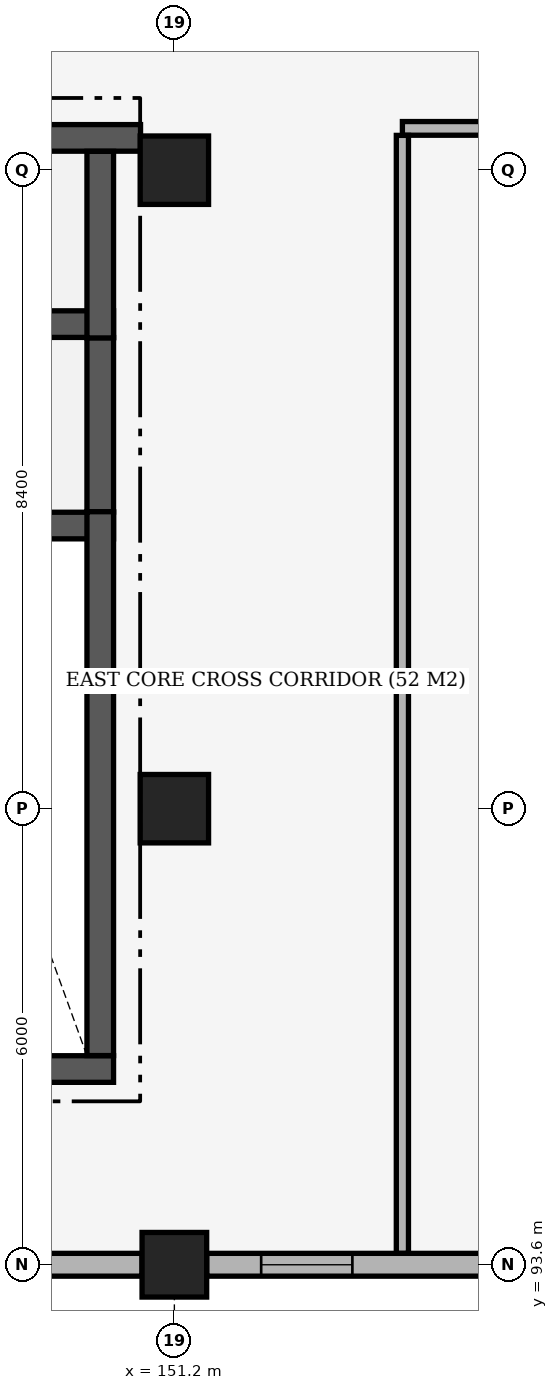
"""IFC4 building model, lengths in metres.
Left out: names, types, materials, properties, quantities, classifications, styles, units other than length and angle.
Written with IfcOpenShell. Run it as: python <this file> out.ifc"""

import sys

from ifc_helpers import new_model, si_unit, direction, frame, frame_2d, origin, origin_2d, place, context, subcontext, project, spatial, rectangle, extrude, element, fill, save


model = new_model("IFC4")
c1 = context("Model", 3, precision=1e-05, world=origin(), true_north=direction((0.0, 1.0)))
c2 = subcontext(c1, "Body", "Model", "MODEL_VIEW")
j1 = project(units=[si_unit("LENGTHUNIT", "METRE"), si_unit("PLANEANGLEUNIT", "RADIAN")], contexts=[c1])
p1 = place(None, origin())
s1 = spatial("IfcSite", under=j1, at=p1, CompositionType="ELEMENT")
p2 = place(p1, origin())
s2 = spatial("IfcBuilding", under=s1, at=p2, CompositionType="ELEMENT")
p3 = place(p2, origin())
s3 = spatial("IfcBuildingStorey", under=s2, at=p3, CompositionType="ELEMENT", Elevation=0.0)
p4 = place(p3, frame((151.2, 93.6, 0.0), z_axis=(0.0, 0.0, 1.0), x_axis=(1.0, 0.0, 0.0)))
e1 = element("IfcColumn", 1, at=p4, inside=s3, PredefinedType="COLUMN", context=c2, shape_type="SweptSolid", body=[
    extrude(rectangle(XDim=0.85, YDim=0.85, at=origin_2d()), origin(), (0.0, 0.0, 1.0), 5.1),
])
for number, where, z_axis, x_axis in (
    (2, (151.2, 99.6, 0.0), (0.0, 0.0, 1.0), (1.0, 0.0, 0.0)),
    (3, (151.2, 108.0, 0.0), (0.0, 0.0, 1.0), (1.0, 0.0, 0.0)),
):
    element("IfcColumn", number, at=place(p3, frame(where, z_axis=z_axis, x_axis=x_axis)), inside=s3, PredefinedType="COLUMN", context=c2, shape_type="SweptSolid", body=[
        extrude(rectangle(XDim=0.9, YDim=0.9, at=origin_2d()), origin(), (0.0, 0.0, 1.0), 5.1),
    ])
p5 = place(p3, frame((156.175, 93.6, 0.0), z_axis=(0.0, 0.0, 1.0), x_axis=(-1.0, 0.0, 0.0)))
e4 = element("IfcWall", 4, at=p5, inside=s3, PredefinedType="SOLIDWALL", context=c2, shape_type="SweptSolid", body=[
    extrude(rectangle(XDim=4.55, YDim=0.3, at=frame_2d((2.275, 0.0))), origin(), (0.0, 0.0, 1.0), 4.22),
])
p6 = place(p5, frame((2.633, 0.0, 0.85)))
e5 = element("IfcOpeningElement", 5, at=p6, cuts=e4, PredefinedType="OPENING", context=c2, shape_type="SweptSolid", body=[
    extrude(rectangle(XDim=1.2, YDim=2.4, at=frame_2d((0.6, 1.2))), frame((0.0, 0.165, 0.0), z_axis=(0.0, -1.0, 0.0), x_axis=(1.0, 0.0, 0.0)), (0.0, 0.0, 1.0), 0.33),
])
p7 = place(p3, frame((150.775, 93.6, 0.0), z_axis=(0.0, 0.0, 1.0), x_axis=(-1.0, 0.0, 0.0)))
e6 = element("IfcWall", 6, at=p7, inside=s3, PredefinedType="SOLIDWALL", context=c2, shape_type="SweptSolid", body=[
    extrude(rectangle(XDim=7.55, YDim=0.3, at=frame_2d((3.775, 0.0))), origin(), (0.0, 0.0, 1.0), 4.12),
])
p8 = place(p7, frame((1.717, 0.0, 0.85)))
e7 = element("IfcOpeningElement", 7, at=p8, cuts=e6, PredefinedType="OPENING", context=c2, shape_type="SweptSolid", body=[
    extrude(rectangle(XDim=1.2, YDim=2.4, at=frame_2d((0.6, 1.2))), frame((0.0, 0.165, 0.0), z_axis=(0.0, -1.0, 0.0), x_axis=(1.0, 0.0, 0.0)), (0.0, 0.0, 1.0), 0.33),
])
p9 = place(p7, frame((4.633, 0.0, 0.85)))
e8 = element("IfcOpeningElement", 8, at=p9, cuts=e6, PredefinedType="OPENING", context=c2, shape_type="SweptSolid", body=[
    extrude(rectangle(XDim=1.2, YDim=2.4, at=frame_2d((0.6, 1.2))), frame((0.0, 0.165, 0.0), z_axis=(0.0, -1.0, 0.0), x_axis=(1.0, 0.0, 0.0)), (0.0, 0.0, 1.0), 0.33),
])
p10 = place(p3, frame((147.468, 103.325, 0.0), z_axis=(0.0, 0.0, 1.0), x_axis=(1.0, 0.0, 0.0)))
e9 = element("IfcWall", 9, at=p10, inside=s3, PredefinedType="SHEAR", context=c2, shape_type="SweptSolid", body=[
    extrude(rectangle(XDim=2.932, YDim=0.35, at=frame_2d((1.466, 0.0))), origin(), (0.0, 0.0, 1.0), 4.82),
])
p11 = place(p3, frame((147.2, 105.975, 0.0), z_axis=(0.0, 0.0, 1.0), x_axis=(1.0, 0.0, 0.0)))
e10 = element("IfcWall", 10, at=p11, inside=s3, PredefinedType="SHEAR", context=c2, shape_type="SweptSolid", body=[
    extrude(rectangle(XDim=3.2, YDim=0.35, at=frame_2d((1.6, 0.0))), origin(), (0.0, 0.0, 1.0), 4.82),
])
p12 = place(p3, frame((150.225, 103.502, 0.0), z_axis=(0.0, 0.0, 1.0), x_axis=(0.0, 1.0, 0.0)))
e11 = element("IfcWall", 11, at=p12, inside=s3, PredefinedType="SHEAR", context=c2, shape_type="SweptSolid", body=[
    extrude(rectangle(XDim=2.296, YDim=0.35, at=frame_2d((1.148, 0.0))), origin(), (0.0, 0.0, 1.0), 4.82),
])
p13 = place(p3, frame((147.2, 108.425, 0.0), z_axis=(0.0, 0.0, 1.0), x_axis=(1.0, 0.0, 0.0)))
e12 = element("IfcWall", 12, at=p13, inside=s3, PredefinedType="SHEAR", context=c2, shape_type="SweptSolid", body=[
    extrude(rectangle(XDim=3.555, YDim=0.35, at=frame_2d((1.777, 0.0))), origin(), (0.0, 0.0, 1.0), 4.82),
])
p14 = place(p3, frame((150.225, 105.793, 0.0), z_axis=(0.0, 0.0, 1.0), x_axis=(0.0, 1.0, 0.0)))
e13 = element("IfcWall", 13, at=p14, inside=s3, PredefinedType="SHEAR", context=c2, shape_type="SweptSolid", body=[
    extrude(rectangle(XDim=2.455, YDim=0.35, at=frame_2d((1.228, 0.0))), origin(), (0.0, 0.0, 1.0), 4.82),
])
p15 = place(p3, frame((147.55, 96.175, 0.0), z_axis=(0.0, 0.0, 1.0), x_axis=(1.0, 0.0, 0.0)))
e14 = element("IfcWall", 14, at=p15, inside=s3, PredefinedType="SHEAR", context=c2, shape_type="SweptSolid", body=[
    extrude(rectangle(XDim=2.85, YDim=0.35, at=frame_2d((1.425, 0.0))), origin(), (0.0, 0.0, 1.0), 4.82),
])
p16 = place(p3, frame((150.225, 96.352, 0.0), z_axis=(0.0, 0.0, 1.0), x_axis=(0.0, 1.0, 0.0)))
e15 = element("IfcWall", 15, at=p16, inside=s3, PredefinedType="SHEAR", context=c2, shape_type="SweptSolid", body=[
    extrude(rectangle(XDim=7.155, YDim=0.35, at=frame_2d((3.578, 0.0))), origin(), (0.0, 0.0, 1.0), 4.82),
])
p17 = place(p3, frame((154.2, 108.55, 0.0), z_axis=(0.0, 0.0, 1.0), x_axis=(1.0, 0.0, 0.0)))
e16 = element("IfcWall", 16, at=p17, inside=s3, PredefinedType="PARTITIONING", context=c2, shape_type="SweptSolid", body=[
    extrude(rectangle(XDim=18.448, YDim=0.18, at=frame_2d((9.224, 0.0))), origin(), (0.0, 0.0, 1.0), 4.17),
])
p18 = place(p17, frame((9.099, 0.0, 0.0)))
e17 = element("IfcOpeningElement", 17, at=p18, cuts=e16, PredefinedType="OPENING", context=c2, shape_type="SweptSolid", body=[
    extrude(rectangle(XDim=1.15, YDim=2.15, at=frame_2d((0.575, 1.075))), frame((0.0, 0.105, 0.0), z_axis=(0.0, -1.0, 0.0), x_axis=(1.0, 0.0, 0.0)), (0.0, 0.0, 1.0), 0.21),
])
p19 = place(p3, frame((154.2, 93.752, 0.0), z_axis=(0.0, 0.0, 1.0), x_axis=(0.0, 1.0, 0.0)))
e18 = element("IfcWall", 18, at=p19, inside=s3, PredefinedType="PARTITIONING", context=c2, shape_type="SweptSolid", body=[
    extrude(rectangle(XDim=14.706, YDim=0.16, at=frame_2d((7.353, 0.0))), origin(), (0.0, 0.0, 1.0), 4.22),
])
p20 = place(p6, origin())
e19 = element("IfcWindow", 19, at=p20, inside=s3, PartitioningType="SINGLE_PANEL", PredefinedType="WINDOW", context=c2, shape_type="SweptSolid", body=[
    extrude(rectangle(XDim=1.2, YDim=2.4, at=frame_2d((0.6, 1.2))), frame((0.0, 0.03, 0.0), z_axis=(0.0, -1.0, 0.0), x_axis=(1.0, 0.0, 0.0)), (0.0, 0.0, 1.0), 0.06),
])
fill(e5, e19)
save(model, sys.argv[1])
